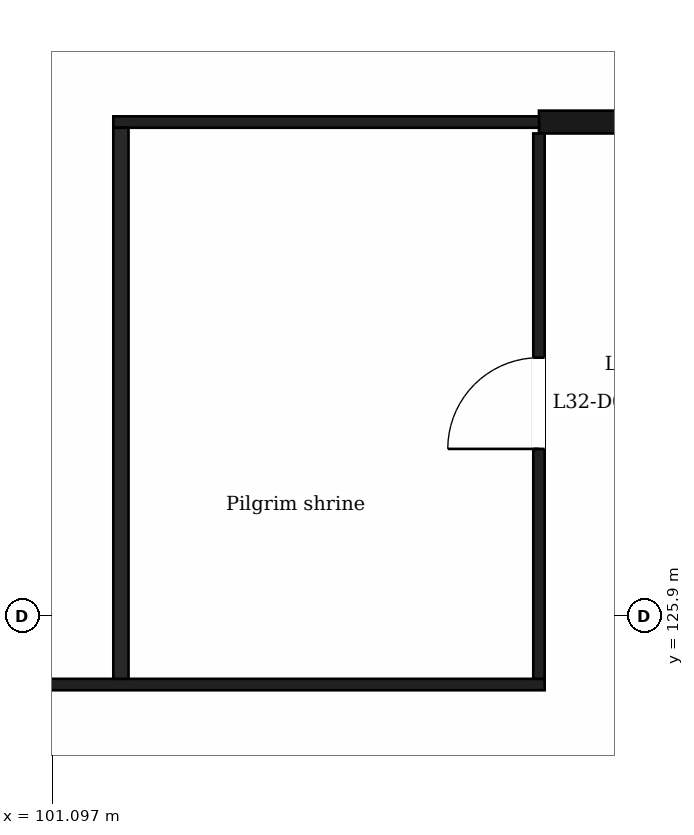
"""IFC4 building model, lengths in metres.
Left out: names, types, materials, properties, quantities, classifications, styles, units other than length and angle.
Written with IfcOpenShell. Run it as: python <this file> out.ifc"""

import sys

from ifc_helpers import new_model, si_unit, direction, frame, frame_2d, origin, place, context, subcontext, project, spatial, rectangle, extrude, element, fill, save


model = new_model("IFC4")
c1 = context("Model", 3, precision=1e-05, world=origin(), true_north=direction((0.0, 1.0)))
c2 = subcontext(c1, "Body", "Model", "MODEL_VIEW")
j1 = project(units=[si_unit("LENGTHUNIT", "METRE"), si_unit("PLANEANGLEUNIT", "RADIAN")], contexts=[c1])
p1 = place(None, origin())
s1 = spatial("IfcSite", under=j1, at=p1, CompositionType="ELEMENT")
p2 = place(p1, origin())
s2 = spatial("IfcBuilding", under=s1, at=p2, CompositionType="ELEMENT")
p3 = place(p2, frame((0.0, 0.0, 135.4)))
s3 = spatial("IfcBuildingStorey", under=s2, at=p3, CompositionType="ELEMENT", Elevation=135.4)
p4 = place(p3, frame((100.8, 125.0, 0.0), z_axis=(0.0, 0.0, 1.0), x_axis=(1.0, 0.0, 0.0)))
e1 = element("IfcWall", 1, at=p4, inside=s3, PredefinedType="PARTITIONING", context=c2, shape_type="SweptSolid", body=[
    extrude(rectangle(XDim=6.775, YDim=0.15, at=frame_2d((3.387, 0.0))), origin(), (0.0, 0.0, 1.0), 6.9),
])
p5 = place(p3, frame((107.5, 132.4, 0.0), z_axis=(0.0, 0.0, 1.0), x_axis=(1.0, 0.0, 0.0)))
e2 = element("IfcWall", 2, at=p5, inside=s3, PredefinedType="PARTITIONING", context=c2, shape_type="SweptSolid", body=[
    extrude(rectangle(XDim=3.4, YDim=0.3, at=frame_2d((1.7, 0.0))), origin(), (0.0, 0.0, 1.0), 1.0),
])
p6 = place(p3, frame((101.9, 132.4, 0.0), z_axis=(0.0, 0.0, 1.0), x_axis=(1.0, 0.0, 0.0)))
e3 = element("IfcWall", 3, at=p6, inside=s3, PredefinedType="PARTITIONING", context=c2, shape_type="SweptSolid", body=[
    extrude(rectangle(XDim=5.6, YDim=0.15, at=frame_2d((2.8, 0.0))), origin(), (0.0, 0.0, 1.0), 6.9),
])
p7 = place(p3, frame((102.0, 125.075, 0.0), z_axis=(0.0, 0.0, 1.0), x_axis=(0.0, 1.0, 0.0)))
e4 = element("IfcWall", 4, at=p7, inside=s3, PredefinedType="PARTITIONING", context=c2, shape_type="SweptSolid", body=[
    extrude(rectangle(XDim=7.25, YDim=0.2, at=frame_2d((3.625, 0.0))), origin(), (0.0, 0.0, 1.0), 6.9),
])
p8 = place(p3, frame((107.5, 125.075, 0.0), z_axis=(0.0, 0.0, 1.0), x_axis=(0.0, 1.0, 0.0)))
e5 = element("IfcWall", 5, at=p8, inside=s3, PredefinedType="PARTITIONING", context=c2, shape_type="SweptSolid", body=[
    extrude(rectangle(XDim=7.175, YDim=0.15, at=frame_2d((3.587, 0.0))), origin(), (0.0, 0.0, 1.0), 6.9),
])
p9 = place(p8, frame((3.025, 0.0, 0.0)))
e6 = element("IfcOpeningElement", 6, at=p9, cuts=e5, PredefinedType="OPENING", context=c2, shape_type="SweptSolid", body=[
    extrude(rectangle(XDim=1.2, YDim=2.1, at=frame_2d((0.6, 1.05))), frame((0.0, 0.085, 0.0), z_axis=(0.0, -1.0, 0.0), x_axis=(1.0, 0.0, 0.0)), (0.0, 0.0, 1.0), 0.17),
])
p10 = place(p9, origin())
e7 = element("IfcDoor", 7, at=p10, inside=s3, OperationType="SINGLE_SWING_LEFT", PredefinedType="DOOR", context=c2, shape_type="SweptSolid", body=[
    extrude(rectangle(XDim=1.2, YDim=2.1, at=frame_2d((0.6, 1.05))), frame((0.0, 0.025, 0.0), z_axis=(0.0, -1.0, 0.0), x_axis=(1.0, 0.0, 0.0)), (0.0, 0.0, 1.0), 0.05),
])
fill(e6, e7)
save(model, sys.argv[1])
